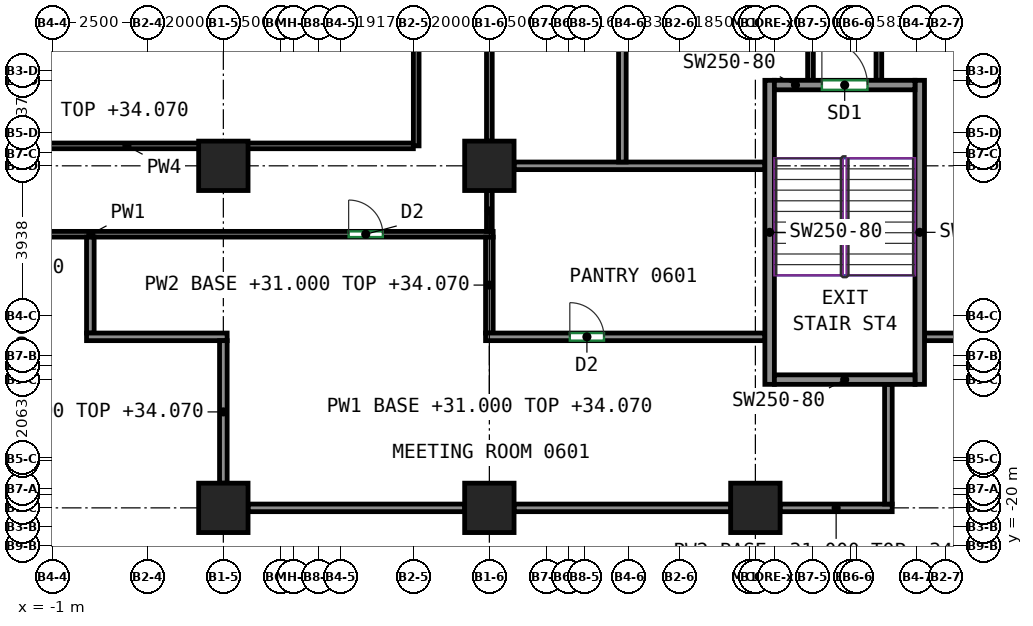
"""IFC4 building model, lengths in metres.
Left out: names, types, materials, properties, quantities, classifications, styles, units other than length and angle.
Written with IfcOpenShell. Run it as: python <this file> out.ifc"""

import sys

from ifc_helpers import new_model, si_unit, direction, frame, frame_2d, origin, origin_2d, place, context, subcontext, project, spatial, rectangle, extrude, source, transform, mapped, element, fill, save


model = new_model("IFC4")
c1 = context("Model", 3, precision=1e-05, world=origin(), true_north=direction((0.0, 1.0)))
c2 = subcontext(c1, "Body", "Model", "MODEL_VIEW")
j1 = project(units=[si_unit("LENGTHUNIT", "METRE"), si_unit("PLANEANGLEUNIT", "RADIAN")], contexts=[c1])
p1 = place(None, origin())
s1 = spatial("IfcSite", under=j1, at=p1, CompositionType="ELEMENT")
p2 = place(p1, origin())
s2 = spatial("IfcBuilding", under=s1, at=p2, CompositionType="ELEMENT")
p3 = place(p2, frame((0.0, 0.0, 31.0)))
s3 = spatial("IfcBuildingStorey", under=s2, at=p3, CompositionType="ELEMENT", Elevation=31.0)
m1 = source(origin(), c2, "Body", "SweptSolid", [
    extrude(rectangle(XDim=1.3, YDim=1.3, at=origin_2d()), origin(), (0.0, 0.0, 1.0), 3.72),
])
for number, where, z_axis, x_axis in (
    (1, (3.5, -19.0, 0.0), (0.0, 0.0, 1.0), (1.0, 0.0, 0.0)),
    (2, (3.5, -10.0, 0.0), (0.0, 0.0, 1.0), (1.0, 0.0, 0.0)),
    (3, (10.5, -19.0, 0.0), (0.0, 0.0, 1.0), (1.0, 0.0, 0.0)),
    (4, (10.5, -10.0, 0.0), (0.0, 0.0, 1.0), (1.0, 0.0, 0.0)),
    (5, (17.5, -19.0, 0.0), (0.0, 0.0, 1.0), (1.0, 0.0, 0.0)),
):
    element("IfcColumn", number, at=place(p3, frame(where, z_axis=z_axis, x_axis=x_axis)), inside=s3, PredefinedType="COLUMN", context=c2, shape_type="MappedRepresentation", body=[
        mapped(m1, transform((0.0, 0.0, 0.0))),
    ])
m2 = source(origin(), c2, "Body", "SweptSolid", [
    extrude(rectangle(XDim=8.0, YDim=0.25, at=frame_2d((4.0, 0.0))), origin(), (0.0, 0.0, 1.0), 3.72),
])
for number, where, z_axis, x_axis in (
    (6, (17.875, -15.75, 0.0), (0.0, 0.0, 1.0), (0.0, 1.0, 0.0)),
    (7, (21.825, -15.75, 0.0), (0.0, 0.0, 1.0), (0.0, 1.0, 0.0)),
):
    element("IfcWall", number, at=place(p3, frame(where, z_axis=z_axis, x_axis=x_axis)), inside=s3, PredefinedType="SHEAR", context=c2, shape_type="MappedRepresentation", body=[
        mapped(m2, transform((0.0, 0.0, 0.0))),
    ])
m3 = source(origin(), c2, "Body", "SweptSolid", [
    extrude(rectangle(XDim=3.7, YDim=0.25, at=frame_2d((1.85, 0.0))), origin(), (0.0, 0.0, 1.0), 3.72),
])
p4 = place(p3, frame((18.0, -15.625, 0.0), z_axis=(0.0, 0.0, 1.0), x_axis=(1.0, 0.0, 0.0)))
e8 = element("IfcWall", 8, at=p4, inside=s3, PredefinedType="SHEAR", context=c2, shape_type="MappedRepresentation", body=[
    mapped(m3, transform((0.0, 0.0, 0.0))),
])
p5 = place(p3, frame((18.0, -7.875, 0.0), z_axis=(0.0, 0.0, 1.0), x_axis=(1.0, 0.0, 0.0)))
e9 = element("IfcWall", 9, at=p5, inside=s3, PredefinedType="SHEAR", context=c2, shape_type="MappedRepresentation", body=[
    mapped(m3, transform((0.0, 0.0, 0.0))),
])
p6 = place(p5, frame((1.25, 0.0, 0.0)))
e10 = element("IfcOpeningElement", 10, at=p6, cuts=e9, PredefinedType="OPENING", context=c2, shape_type="SweptSolid", body=[
    extrude(rectangle(XDim=1.2, YDim=2.1, at=frame_2d((0.6, 1.05))), frame((0.0, 0.135, 0.0), z_axis=(0.0, -1.0, 0.0), x_axis=(1.0, 0.0, 0.0)), (0.0, 0.0, 1.0), 0.27),
])
p7 = place(p3, frame((-10.575, -11.8, 0.0), z_axis=(0.0, 0.0, 1.0), x_axis=(1.0, 0.0, 0.0)))
e11 = element("IfcWall", 11, at=p7, inside=s3, PredefinedType="PARTITIONING", context=c2, shape_type="SweptSolid", body=[
    extrude(rectangle(XDim=21.175, YDim=0.15, at=frame_2d((10.587, 0.0))), origin(), (0.0, 0.0, 1.0), 3.72),
])
p8 = place(p7, frame((4.544, 0.0, 0.0)))
e12 = element("IfcOpeningElement", 12, at=p8, cuts=e11, PredefinedType="OPENING", context=c2, shape_type="SweptSolid", body=[
    extrude(rectangle(XDim=1.8, YDim=2.1, at=frame_2d((0.9, 1.05))), frame((0.0, 0.085, 0.0), z_axis=(0.0, -1.0, 0.0), x_axis=(1.0, 0.0, 0.0)), (0.0, 0.0, 1.0), 0.17),
])
p9 = place(p7, frame((17.372, 0.0, 0.0)))
e13 = element("IfcOpeningElement", 13, at=p9, cuts=e11, PredefinedType="OPENING", context=c2, shape_type="SweptSolid", body=[
    extrude(rectangle(XDim=0.9, YDim=2.1, at=frame_2d((0.45, 1.05))), frame((0.0, 0.085, 0.0), z_axis=(0.0, -1.0, 0.0), x_axis=(1.0, 0.0, 0.0)), (0.0, 0.0, 1.0), 0.17),
])
p10 = place(p3, frame((10.5, -11.725, 0.0), z_axis=(0.0, 0.0, 1.0), x_axis=(0.0, 1.0, 0.0)))
e14 = element("IfcWall", 14, at=p10, inside=s3, PredefinedType="PARTITIONING", context=c2, shape_type="SweptSolid", body=[
    extrude(rectangle(XDim=1.075, YDim=0.15, at=frame_2d((0.538, 0.0))), origin(), (0.0, 0.0, 1.0), 3.07),
])
p11 = place(p3, frame((10.5, -9.35, 0.0), z_axis=(0.0, 0.0, 1.0), x_axis=(0.0, 1.0, 0.0)))
e15 = element("IfcWall", 15, at=p11, inside=s3, PredefinedType="PARTITIONING", context=c2, shape_type="SweptSolid", body=[
    extrude(rectangle(XDim=7.7, YDim=0.15, at=frame_2d((3.85, 0.0))), origin(), (0.0, 0.0, 1.0), 3.07),
])
p12 = place(p11, frame((5.279, 0.0, 0.0)))
e16 = element("IfcOpeningElement", 16, at=p12, cuts=e15, PredefinedType="OPENING", context=c2, shape_type="SweptSolid", body=[
    extrude(rectangle(XDim=0.9, YDim=2.1, at=frame_2d((0.45, 1.05))), frame((0.0, 0.085, 0.0), z_axis=(0.0, -1.0, 0.0), x_axis=(1.0, 0.0, 0.0)), (0.0, 0.0, 1.0), 0.17),
])
p13 = place(p3, frame((18.95, -7.75, 0.0), z_axis=(0.0, 0.0, 1.0), x_axis=(0.0, 1.0, 0.0)))
e17 = element("IfcWall", 17, at=p13, inside=s3, PredefinedType="PARTITIONING", context=c2, shape_type="SweptSolid", body=[
    extrude(rectangle(XDim=6.66, YDim=0.15, at=frame_2d((3.33, 0.0))), origin(), (0.0, 0.0, 1.0), 3.72),
])
p14 = place(p13, frame((2.728, 0.0, 0.0)))
e18 = element("IfcOpeningElement", 18, at=p14, cuts=e17, PredefinedType="OPENING", context=c2, shape_type="SweptSolid", body=[
    extrude(rectangle(XDim=0.9, YDim=2.1, at=frame_2d((0.45, 1.05))), frame((0.0, 0.085, 0.0), z_axis=(0.0, -1.0, 0.0), x_axis=(1.0, 0.0, 0.0)), (0.0, 0.0, 1.0), 0.17),
])
p15 = place(p3, frame((20.75, -7.75, 0.0), z_axis=(0.0, 0.0, 1.0), x_axis=(0.0, 1.0, 0.0)))
e19 = element("IfcWall", 19, at=p15, inside=s3, PredefinedType="PARTITIONING", context=c2, shape_type="SweptSolid", body=[
    extrude(rectangle(XDim=13.35, YDim=0.15, at=frame_2d((6.675, 0.0))), origin(), (0.0, 0.0, 1.0), 3.72),
])
p16 = place(p15, frame((9.74, 0.0, 0.0)))
e20 = element("IfcOpeningElement", 20, at=p16, cuts=e19, PredefinedType="OPENING", context=c2, shape_type="SweptSolid", body=[
    extrude(rectangle(XDim=1.0, YDim=2.1, at=frame_2d((0.5, 1.05))), frame((0.0, 0.085, 0.0), z_axis=(0.0, -1.0, 0.0), x_axis=(1.0, 0.0, 0.0)), (0.0, 0.0, 1.0), 0.17),
])
p17 = place(p3, frame((0.0, -14.4, 0.0), z_axis=(0.0, 0.0, 1.0), x_axis=(0.0, 1.0, 0.0)))
e21 = element("IfcWall", 21, at=p17, inside=s3, PredefinedType="PARTITIONING", context=c2, shape_type="SweptSolid", body=[
    extrude(rectangle(XDim=2.524, YDim=0.2, at=frame_2d((1.262, 0.0))), origin(), (0.0, 0.0, 1.0), 3.72),
])
p18 = place(p3, frame((-0.1, -14.5, 0.0), z_axis=(0.0, 0.0, 1.0), x_axis=(1.0, 0.0, 0.0)))
e22 = element("IfcWall", 22, at=p18, inside=s3, PredefinedType="PARTITIONING", context=c2, shape_type="SweptSolid", body=[
    extrude(rectangle(XDim=3.7, YDim=0.2, at=frame_2d((1.85, 0.0))), origin(), (0.0, 0.0, 1.0), 3.72),
])
p19 = place(p3, frame((3.5, -18.35, 0.0), z_axis=(0.0, 0.0, 1.0), x_axis=(0.0, 1.0, 0.0)))
e23 = element("IfcWall", 23, at=p19, inside=s3, PredefinedType="PARTITIONING", context=c2, shape_type="SweptSolid", body=[
    extrude(rectangle(XDim=3.75, YDim=0.2, at=frame_2d((1.875, 0.0))), origin(), (0.0, 0.0, 1.0), 3.07),
])
for number, where, z_axis, x_axis in (
    (24, (4.15, -19.0, 0.0), (0.0, 0.0, 1.0), (1.0, 0.0, 0.0)),
    (25, (11.15, -19.0, 0.0), (0.0, 0.0, 1.0), (1.0, 0.0, 0.0)),
):
    element("IfcWall", number, at=place(p3, frame(where, z_axis=z_axis, x_axis=x_axis)), inside=s3, PredefinedType="PARTITIONING", context=c2, shape_type="SweptSolid", body=[
        extrude(rectangle(XDim=5.7, YDim=0.2, at=frame_2d((2.85, 0.0))), origin(), (0.0, 0.0, 1.0), 3.72),
    ])
p20 = place(p3, frame((18.15, -19.0, 0.0), z_axis=(0.0, 0.0, 1.0), x_axis=(1.0, 0.0, 0.0)))
e26 = element("IfcWall", 26, at=p20, inside=s3, PredefinedType="PARTITIONING", context=c2, shape_type="SweptSolid", body=[
    extrude(rectangle(XDim=2.95, YDim=0.2, at=frame_2d((1.475, 0.0))), origin(), (0.0, 0.0, 1.0), 3.07),
])
p21 = place(p3, frame((21.0, -15.75, 0.0), z_axis=(0.0, 0.0, 1.0), x_axis=(0.0, -1.0, 0.0)))
e27 = element("IfcWall", 27, at=p21, inside=s3, PredefinedType="PARTITIONING", context=c2, shape_type="SweptSolid", body=[
    extrude(rectangle(XDim=3.15, YDim=0.2, at=frame_2d((1.575, 0.0))), origin(), (0.0, 0.0, 1.0), 3.72),
])
p22 = place(p3, frame((21.95, -14.5, 0.0), z_axis=(0.0, 0.0, 1.0), x_axis=(1.0, 0.0, 0.0)))
e28 = element("IfcWall", 28, at=p22, inside=s3, PredefinedType="PARTITIONING", context=c2, shape_type="SweptSolid", body=[
    extrude(rectangle(XDim=5.8, YDim=0.2, at=frame_2d((2.9, 0.0))), origin(), (0.0, 0.0, 1.0), 3.72),
])
p23 = place(p3, frame((10.5, -14.4, 0.0), z_axis=(0.0, 0.0, 1.0), x_axis=(0.0, 1.0, 0.0)))
e29 = element("IfcWall", 29, at=p23, inside=s3, PredefinedType="PARTITIONING", context=c2, shape_type="SweptSolid", body=[
    extrude(rectangle(XDim=2.524, YDim=0.2, at=frame_2d((1.262, 0.0))), origin(), (0.0, 0.0, 1.0), 3.07),
])
p24 = place(p3, frame((10.4, -14.5, 0.0), z_axis=(0.0, 0.0, 1.0), x_axis=(1.0, 0.0, 0.0)))
e30 = element("IfcWall", 30, at=p24, inside=s3, PredefinedType="PARTITIONING", context=c2, shape_type="SweptSolid", body=[
    extrude(rectangle(XDim=7.35, YDim=0.2, at=frame_2d((3.675, 0.0))), origin(), (0.0, 0.0, 1.0), 3.72),
])
p25 = place(p24, frame((2.217, 0.0, 0.0)))
e31 = element("IfcOpeningElement", 31, at=p25, cuts=e30, PredefinedType="OPENING", context=c2, shape_type="SweptSolid", body=[
    extrude(rectangle(XDim=0.9, YDim=2.1, at=frame_2d((0.45, 1.05))), frame((0.0, 0.11, 0.0), z_axis=(0.0, -1.0, 0.0), x_axis=(1.0, 0.0, 0.0)), (0.0, 0.0, 1.0), 0.22),
])
p26 = place(p3, frame((11.15, -10.0, 0.0), z_axis=(0.0, 0.0, 1.0), x_axis=(1.0, 0.0, 0.0)))
e32 = element("IfcWall", 32, at=p26, inside=s3, PredefinedType="PARTITIONING", context=c2, shape_type="SweptSolid", body=[
    extrude(rectangle(XDim=6.6, YDim=0.2, at=frame_2d((3.3, 0.0))), origin(), (0.0, 0.0, 1.0), 3.72),
])
p27 = place(p3, frame((14.0, -9.9, 0.0), z_axis=(0.0, 0.0, 1.0), x_axis=(0.0, 1.0, 0.0)))
e33 = element("IfcWall", 33, at=p27, inside=s3, PredefinedType="PARTITIONING", context=c2, shape_type="SweptSolid", body=[
    extrude(rectangle(XDim=8.8, YDim=0.2, at=frame_2d((4.4, 0.0))), origin(), (0.0, 0.0, 1.0), 3.72),
])
p28 = place(p3, frame((8.5, -9.475, 0.0), z_axis=(0.0, 0.0, 1.0), x_axis=(-1.0, 0.0, 0.0)))
e34 = element("IfcWall", 34, at=p28, inside=s3, PredefinedType="PARTITIONING", context=c2, shape_type="SweptSolid", body=[
    extrude(rectangle(XDim=15.075, YDim=0.15, at=frame_2d((7.538, 0.0))), origin(), (0.0, 0.0, 1.0), 3.72),
])
p29 = place(p3, frame((8.575, 5.675, 0.0), z_axis=(0.0, 0.0, 1.0), x_axis=(0.0, -1.0, 0.0)))
e35 = element("IfcWall", 35, at=p29, inside=s3, PredefinedType="PARTITIONING", context=c2, shape_type="SweptSolid", body=[
    extrude(rectangle(XDim=15.15, YDim=0.15, at=frame_2d((7.575, 0.0))), origin(), (0.0, 0.0, 1.0), 3.72),
])
p30 = place(p6, origin())
e36 = element("IfcDoor", 36, at=p30, inside=s3, OperationType="DOUBLE_DOOR_SINGLE_SWING", PredefinedType="DOOR", context=c2, shape_type="SweptSolid", body=[
    extrude(rectangle(XDim=1.2, YDim=2.1, at=frame_2d((0.6, 1.05))), frame((0.0, 0.025, 0.0), z_axis=(0.0, -1.0, 0.0), x_axis=(1.0, 0.0, 0.0)), (0.0, 0.0, 1.0), 0.05),
])
fill(e10, e36)
p31 = place(p25, origin())
e37 = element("IfcDoor", 37, at=p31, inside=s3, OperationType="SINGLE_SWING_LEFT", PredefinedType="DOOR", context=c2, shape_type="SweptSolid", body=[
    extrude(rectangle(XDim=0.9, YDim=2.1, at=frame_2d((0.45, 1.05))), frame((0.0, 0.025, 0.0), z_axis=(0.0, -1.0, 0.0), x_axis=(1.0, 0.0, 0.0)), (0.0, 0.0, 1.0), 0.05),
])
fill(e31, e37)
p32 = place(p9, origin())
e38 = element("IfcDoor", 38, at=p32, inside=s3, OperationType="SINGLE_SWING_LEFT", PredefinedType="DOOR", context=c2, shape_type="SweptSolid", body=[
    extrude(rectangle(XDim=0.9, YDim=2.1, at=frame_2d((0.45, 1.05))), frame((0.0, 0.025, 0.0), z_axis=(0.0, -1.0, 0.0), x_axis=(1.0, 0.0, 0.0)), (0.0, 0.0, 1.0), 0.05),
])
fill(e13, e38)
save(model, sys.argv[1])
